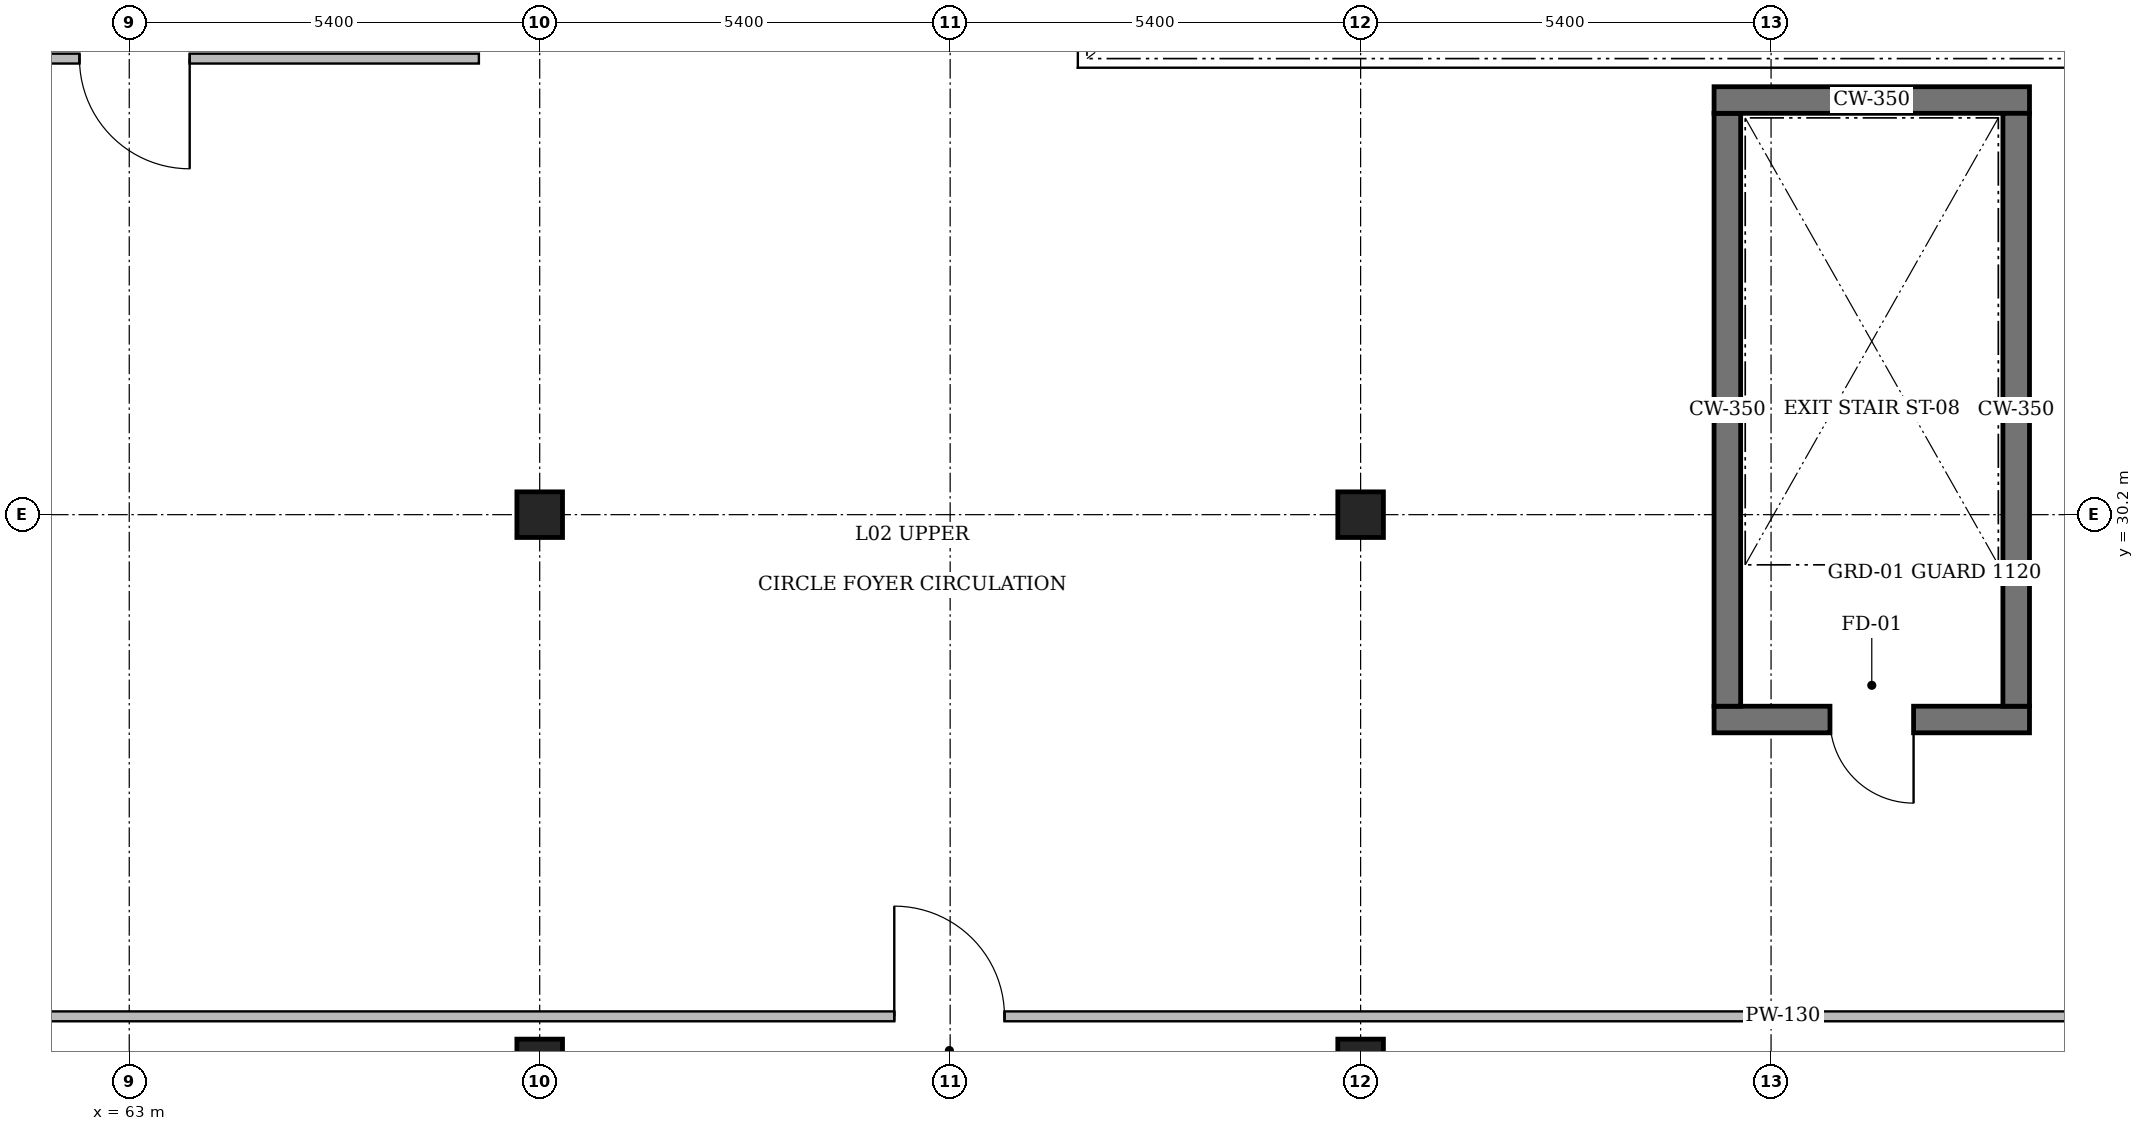
"""IFC4 building model, lengths in metres.
Left out: names, types, materials, properties, quantities, classifications, styles, units other than length and angle.
Written with IfcOpenShell. Run it as: python <this file> out.ifc"""

import sys

from ifc_helpers import new_model, si_unit, direction, frame, frame_2d, origin, origin_2d, place, context, subcontext, project, spatial, rectangle, circle, extrude, element, fill, save


model = new_model("IFC4")
c1 = context("Model", 3, precision=1e-05, world=origin(), true_north=direction((0.0, 1.0)))
c2 = subcontext(c1, "Body", "Model", "MODEL_VIEW")
j1 = project(units=[si_unit("LENGTHUNIT", "METRE"), si_unit("PLANEANGLEUNIT", "RADIAN")], contexts=[c1])
p1 = place(None, origin())
s1 = spatial("IfcSite", under=j1, at=p1, CompositionType="ELEMENT")
p2 = place(p1, origin())
s2 = spatial("IfcBuilding", under=s1, at=p2, CompositionType="ELEMENT")
p3 = place(p2, frame((0.0, 0.0, 9.0)))
s3 = spatial("IfcBuildingStorey", under=s2, at=p3, CompositionType="ELEMENT", Elevation=9.0)
for number, where, z_axis, x_axis in (
    (1, (68.4, 23.0, 0.0), (0.0, 0.0, 1.0), (1.0, 0.0, 0.0)),
    (2, (68.4, 30.2, 0.0), (0.0, 0.0, 1.0), (1.0, 0.0, 0.0)),
    (3, (79.2, 23.0, 0.0), (0.0, 0.0, 1.0), (1.0, 0.0, 0.0)),
    (4, (79.2, 30.2, 0.0), (0.0, 0.0, 1.0), (1.0, 0.0, 0.0)),
):
    element("IfcColumn", number, at=place(p3, frame(where, z_axis=z_axis, x_axis=x_axis)), inside=s3, PredefinedType="COLUMN", context=c2, shape_type="SweptSolid", body=[
        extrude(circle(Radius=0.3, at=origin_2d()), origin(), (0.0, 0.0, 1.0), 4.2),
    ])
p4 = place(p3, frame((88.0, 27.505, 0.0), z_axis=(0.0, 0.0, 1.0), x_axis=(-1.0, 0.0, 0.0)))
e5 = element("IfcWall", 5, at=p4, inside=s3, PredefinedType="SOLIDWALL", context=c2, shape_type="SweptSolid", body=[
    extrude(rectangle(XDim=4.15, YDim=0.35, at=frame_2d((2.075, 0.0))), origin(), (0.0, 0.0, 1.0), 4.5),
])
p5 = place(p4, frame((1.525, 0.0, 0.0)))
e6 = element("IfcOpeningElement", 6, at=p5, cuts=e5, PredefinedType="OPENING", context=c2, shape_type="SweptSolid", body=[
    extrude(rectangle(XDim=1.1, YDim=2.15, at=frame_2d((0.55, 1.075))), frame((0.0, 0.195, 0.0), z_axis=(0.0, -1.0, 0.0), x_axis=(1.0, 0.0, 0.0)), (0.0, 0.0, 1.0), 0.39),
])
p6 = place(p3, frame((84.025, 27.68, 0.0), z_axis=(0.0, 0.0, 1.0), x_axis=(0.0, 1.0, 0.0)))
e7 = element("IfcWall", 7, at=p6, inside=s3, PredefinedType="SOLIDWALL", context=c2, shape_type="SweptSolid", body=[
    extrude(rectangle(XDim=7.8, YDim=0.35, at=frame_2d((3.9, 0.0))), origin(), (0.0, 0.0, 1.0), 4.5),
])
p7 = place(p3, frame((83.85, 35.655, 0.0), z_axis=(0.0, 0.0, 1.0), x_axis=(1.0, 0.0, 0.0)))
e8 = element("IfcWall", 8, at=p7, inside=s3, PredefinedType="SOLIDWALL", context=c2, shape_type="SweptSolid", body=[
    extrude(rectangle(XDim=4.15, YDim=0.35, at=frame_2d((2.075, 0.0))), origin(), (0.0, 0.0, 1.0), 4.5),
])
p8 = place(p3, frame((87.825, 35.48, 0.0), z_axis=(0.0, 0.0, 1.0), x_axis=(0.0, -1.0, 0.0)))
e9 = element("IfcWall", 9, at=p8, inside=s3, PredefinedType="SOLIDWALL", context=c2, shape_type="SweptSolid", body=[
    extrude(rectangle(XDim=7.8, YDim=0.35, at=frame_2d((3.9, 0.0))), origin(), (0.0, 0.0, 1.0), 4.5),
])
p9 = place(p3, frame((57.8, 23.6, 0.0), z_axis=(0.0, 0.0, 1.0), x_axis=(1.0, 0.0, 0.0)))
e10 = element("IfcWall", 10, at=p9, inside=s3, PredefinedType="PARTITIONING", context=c2, shape_type="SweptSolid", body=[
    extrude(rectangle(XDim=37.2, YDim=0.13, at=frame_2d((18.6, 0.0))), origin(), (0.0, 0.0, 1.0), 3.96),
])
p10 = place(p9, frame((15.265, 0.0, 0.0)))
e11 = element("IfcOpeningElement", 11, at=p10, cuts=e10, PredefinedType="OPENING", context=c2, shape_type="SweptSolid", body=[
    extrude(rectangle(XDim=1.45, YDim=2.2, at=frame_2d((0.725, 1.1))), frame((0.0, 0.085, 0.0), z_axis=(0.0, -1.0, 0.0), x_axis=(1.0, 0.0, 0.0)), (0.0, 0.0, 1.0), 0.17),
])
p11 = place(p3, frame((67.6, 36.2, 0.0), z_axis=(0.0, 0.0, 1.0), x_axis=(-1.0, 0.0, 0.0)))
e12 = element("IfcWall", 12, at=p11, inside=s3, PredefinedType="PARTITIONING", context=c2, shape_type="SweptSolid", body=[
    extrude(rectangle(XDim=9.8, YDim=0.13, at=frame_2d((4.9, 0.0))), origin(), (0.0, 0.0, 1.0), 3.96),
])
p12 = place(p11, frame((3.805, 0.0, 0.0)))
e13 = element("IfcOpeningElement", 13, at=p12, cuts=e12, PredefinedType="OPENING", context=c2, shape_type="SweptSolid", body=[
    extrude(rectangle(XDim=1.45, YDim=2.2, at=frame_2d((0.725, 1.1))), frame((0.0, 0.085, 0.0), z_axis=(0.0, -1.0, 0.0), x_axis=(1.0, 0.0, 0.0)), (0.0, 0.0, 1.0), 0.17),
])
p13 = place(p5, origin())
e14 = element("IfcDoor", 14, at=p13, inside=s3, OperationType="SINGLE_SWING_LEFT", PredefinedType="DOOR", context=c2, shape_type="SweptSolid", body=[
    extrude(rectangle(XDim=1.1, YDim=2.15, at=frame_2d((0.55, 1.075))), frame((0.0, 0.025, 0.0), z_axis=(0.0, -1.0, 0.0), x_axis=(1.0, 0.0, 0.0)), (0.0, 0.0, 1.0), 0.05),
])
fill(e6, e14)
p14 = place(p10, origin())
e15 = element("IfcDoor", 15, at=p14, inside=s3, OperationType="DOUBLE_DOOR_SINGLE_SWING", PredefinedType="DOOR", context=c2, shape_type="SweptSolid", body=[
    extrude(rectangle(XDim=1.45, YDim=2.2, at=frame_2d((0.725, 1.1))), frame((0.0, 0.025, 0.0), z_axis=(0.0, -1.0, 0.0), x_axis=(1.0, 0.0, 0.0)), (0.0, 0.0, 1.0), 0.05),
])
fill(e11, e15)
p15 = place(p12, origin())
e16 = element("IfcDoor", 16, at=p15, inside=s3, OperationType="DOUBLE_DOOR_SINGLE_SWING", PredefinedType="DOOR", context=c2, shape_type="SweptSolid", body=[
    extrude(rectangle(XDim=1.45, YDim=2.2, at=frame_2d((0.725, 1.1))), frame((0.0, 0.025, 0.0), z_axis=(0.0, -1.0, 0.0), x_axis=(1.0, 0.0, 0.0)), (0.0, 0.0, 1.0), 0.05),
])
fill(e13, e16)
save(model, sys.argv[1])
